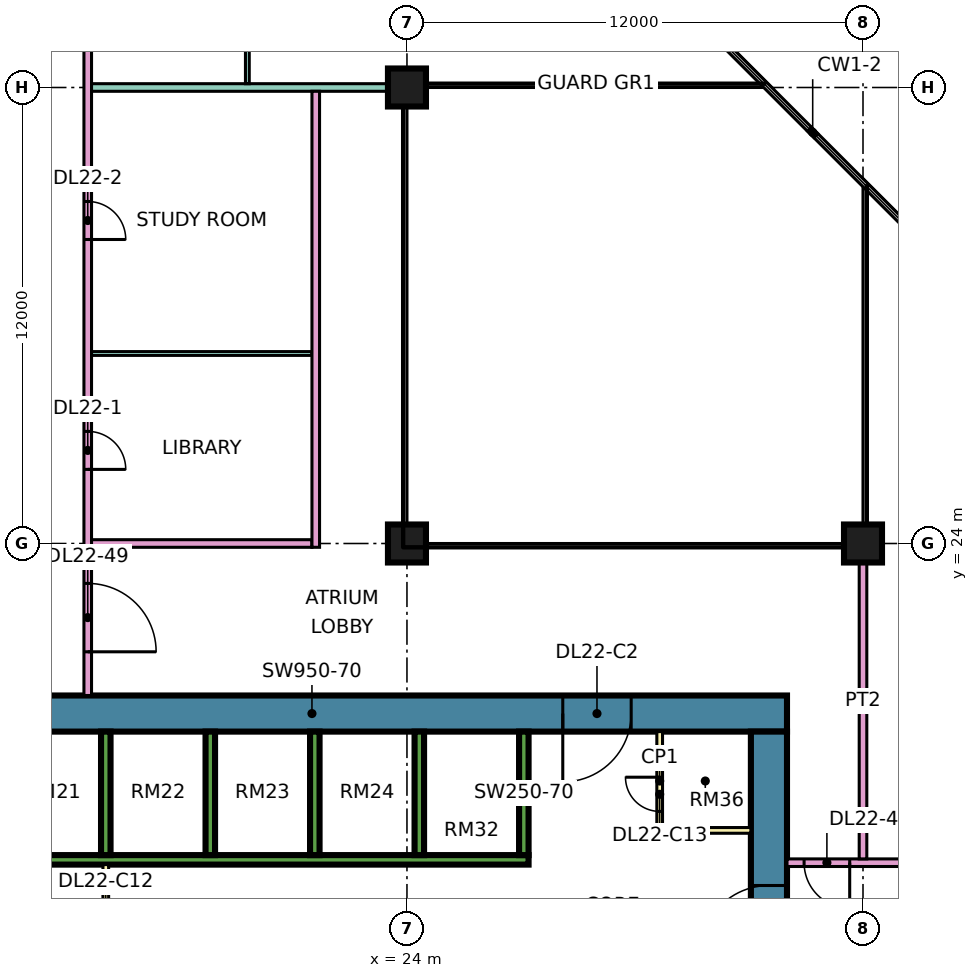
"""IFC4 building model, lengths in metres.
Left out: names, types, materials, properties, quantities, classifications, styles, units other than length and angle.
Written with IfcOpenShell. Run it as: python <this file> out.ifc"""

import sys

from ifc_helpers import new_model, si_unit, direction, frame, frame_2d, origin, origin_2d, place, context, subcontext, project, spatial, rectangle, extrude, element, fill, save


model = new_model("IFC4")
c1 = context("Model", 3, precision=1e-05, world=origin(), true_north=direction((0.0, 1.0)))
c2 = subcontext(c1, "Body", "Model", "MODEL_VIEW")
j1 = project(units=[si_unit("LENGTHUNIT", "METRE"), si_unit("PLANEANGLEUNIT", "RADIAN")], contexts=[c1])
p1 = place(None, origin())
s1 = spatial("IfcSite", under=j1, at=p1, CompositionType="ELEMENT")
p2 = place(p1, origin())
s2 = spatial("IfcBuilding", under=s1, at=p2, CompositionType="ELEMENT")
p3 = place(p2, frame((0.0, 0.0, 99.4)))
s3 = spatial("IfcBuildingStorey", under=s2, at=p3, CompositionType="ELEMENT", Elevation=99.4)
for number, where, z_axis, x_axis in (
    (1, (24.0, 24.0, 0.0), (0.0, 0.0, 1.0), (1.0, 0.0, 0.0)),
    (2, (24.0, 36.0, 0.0), (0.0, 0.0, 1.0), (1.0, 0.0, 0.0)),
    (3, (36.0, 24.0, 0.0), (0.0, 0.0, 1.0), (1.0, 0.0, 0.0)),
):
    element("IfcColumn", number, at=place(p3, frame(where, z_axis=z_axis, x_axis=x_axis)), inside=s3, PredefinedType="COLUMN", context=c2, shape_type="SweptSolid", body=[
        extrude(rectangle(XDim=1.0, YDim=1.0, at=origin_2d()), origin(), (0.0, 0.0, 1.0), 3.75),
    ])
p4 = place(p3, frame((9.0, 19.525, 0.0), z_axis=(0.0, 0.0, 1.0), x_axis=(1.0, 0.0, 0.0)))
e4 = element("IfcWall", 4, at=p4, inside=s3, PredefinedType="SHEAR", context=c2, shape_type="SweptSolid", body=[
    extrude(rectangle(XDim=25.0, YDim=0.95, at=frame_2d((12.5, 0.0))), origin(), (0.0, 0.0, 1.0), 3.75),
])
p5 = place(p4, frame((19.1, 0.0, 0.0)))
e5 = element("IfcOpeningElement", 5, at=p5, cuts=e4, PredefinedType="OPENING", context=c2, shape_type="SweptSolid", body=[
    extrude(rectangle(XDim=1.8, YDim=2.4, at=frame_2d((0.9, 1.2))), frame((0.0, 0.485, 0.0), z_axis=(0.0, -1.0, 0.0), x_axis=(1.0, 0.0, 0.0)), (0.0, 0.0, 1.0), 0.97),
])
p6 = place(p3, frame((33.525, 7.95, 0.0), z_axis=(0.0, 0.0, 1.0), x_axis=(0.0, 1.0, 0.0)))
e6 = element("IfcWall", 6, at=p6, inside=s3, PredefinedType="SHEAR", context=c2, shape_type="SweptSolid", body=[
    extrude(rectangle(XDim=11.1, YDim=0.95, at=frame_2d((5.55, 0.0))), origin(), (0.0, 0.0, 1.0), 3.75),
])
p7 = place(p6, frame((5.25, 0.0, 0.0)))
e7 = element("IfcOpeningElement", 7, at=p7, cuts=e6, PredefinedType="OPENING", context=c2, shape_type="SweptSolid", body=[
    extrude(rectangle(XDim=1.8, YDim=2.4, at=frame_2d((0.9, 1.2))), frame((0.0, 0.485, 0.0), z_axis=(0.0, -1.0, 0.0), x_axis=(1.0, 0.0, 0.0)), (0.0, 0.0, 1.0), 0.97),
])
p8 = place(p3, frame((13.45, 15.675, 0.0), z_axis=(0.0, 0.0, 1.0), x_axis=(1.0, 0.0, 0.0)))
e8 = element("IfcWall", 8, at=p8, inside=s3, PredefinedType="SHEAR", context=c2, shape_type="SweptSolid", body=[
    extrude(rectangle(XDim=13.75, YDim=0.25, at=frame_2d((6.875, 0.0))), origin(), (0.0, 0.0, 1.0), 3.75),
])
for number, where, z_axis, x_axis in (
    (9, (16.075, 15.8, 0.0), (0.0, 0.0, 1.0), (0.0, 1.0, 0.0)),
    (10, (18.825, 15.8, 0.0), (0.0, 0.0, 1.0), (0.0, 1.0, 0.0)),
    (11, (21.575, 15.8, 0.0), (0.0, 0.0, 1.0), (0.0, 1.0, 0.0)),
    (12, (24.325, 15.8, 0.0), (0.0, 0.0, 1.0), (0.0, 1.0, 0.0)),
    (13, (27.075, 15.8, 0.0), (0.0, 0.0, 1.0), (0.0, 1.0, 0.0)),
):
    element("IfcWall", number, at=place(p3, frame(where, z_axis=z_axis, x_axis=x_axis)), inside=s3, PredefinedType="SHEAR", context=c2, shape_type="SweptSolid", body=[
        extrude(rectangle(XDim=3.25, YDim=0.25, at=frame_2d((1.625, 0.0))), origin(), (0.0, 0.0, 1.0), 3.75),
    ])
p9 = place(p3, frame((16.075, 11.45, 0.0), z_axis=(0.0, 0.0, 1.0), x_axis=(0.0, 1.0, 0.0)))
e14 = element("IfcWall", 14, at=p9, inside=s3, PredefinedType="PARTITIONING", context=c2, shape_type="SweptSolid", body=[
    extrude(rectangle(XDim=4.1, YDim=0.15, at=frame_2d((2.05, 0.0))), origin(), (0.0, 0.0, 1.0), 3.35),
])
p10 = place(p9, frame((1.15, 0.0, 0.0)))
e15 = element("IfcOpeningElement", 15, at=p10, cuts=e14, PredefinedType="OPENING", context=c2, shape_type="SweptSolid", body=[
    extrude(rectangle(XDim=1.8, YDim=2.4, at=frame_2d((0.9, 1.2))), frame((0.0, 0.085, 0.0), z_axis=(0.0, -1.0, 0.0), x_axis=(1.0, 0.0, 0.0)), (0.0, 0.0, 1.0), 0.17),
])
p11 = place(p3, frame((30.65, 16.45, 0.0), z_axis=(0.0, 0.0, 1.0), x_axis=(0.0, 1.0, 0.0)))
e16 = element("IfcWall", 16, at=p11, inside=s3, PredefinedType="PARTITIONING", context=c2, shape_type="SweptSolid", body=[
    extrude(rectangle(XDim=2.6, YDim=0.15, at=frame_2d((1.3, 0.0))), origin(), (0.0, 0.0, 1.0), 3.35),
])
p12 = place(p11, frame((0.5, 0.0, 0.0)))
e17 = element("IfcOpeningElement", 17, at=p12, cuts=e16, PredefinedType="OPENING", context=c2, shape_type="SweptSolid", body=[
    extrude(rectangle(XDim=0.9, YDim=2.1, at=frame_2d((0.45, 1.05))), frame((0.0, 0.085, 0.0), z_axis=(0.0, -1.0, 0.0), x_axis=(1.0, 0.0, 0.0)), (0.0, 0.0, 1.0), 0.17),
])
p13 = place(p3, frame((30.65, 16.45, 0.0), z_axis=(0.0, 0.0, 1.0), x_axis=(1.0, 0.0, 0.0)))
e18 = element("IfcWall", 18, at=p13, inside=s3, PredefinedType="PARTITIONING", context=c2, shape_type="SweptSolid", body=[
    extrude(rectangle(XDim=2.4, YDim=0.15, at=frame_2d((1.2, 0.0))), origin(), (0.0, 0.0, 1.0), 3.35),
])
p14 = place(p3, frame((15.6, 20.0, 0.0), z_axis=(0.0, 0.0, 1.0), x_axis=(0.0, 1.0, 0.0)))
e19 = element("IfcWall", 19, at=p14, inside=s3, PredefinedType="PARTITIONING", context=c2, shape_type="SweptSolid", body=[
    extrude(rectangle(XDim=27.775, YDim=0.2, at=frame_2d((13.887, 0.0))), origin(), (0.0, 0.0, 1.0), 3.35),
])
p15 = place(p14, frame((5.95, 0.0, 0.0)))
e20 = element("IfcOpeningElement", 20, at=p15, cuts=e19, PredefinedType="OPENING", context=c2, shape_type="SweptSolid", body=[
    extrude(rectangle(XDim=1.0, YDim=2.1, at=frame_2d((0.5, 1.05))), frame((0.0, 0.11, 0.0), z_axis=(0.0, -1.0, 0.0), x_axis=(1.0, 0.0, 0.0)), (0.0, 0.0, 1.0), 0.22),
])
p16 = place(p14, frame((12.0, 0.0, 0.0)))
e21 = element("IfcOpeningElement", 21, at=p16, cuts=e19, PredefinedType="OPENING", context=c2, shape_type="SweptSolid", body=[
    extrude(rectangle(XDim=1.0, YDim=2.1, at=frame_2d((0.5, 1.05))), frame((0.0, 0.11, 0.0), z_axis=(0.0, -1.0, 0.0), x_axis=(1.0, 0.0, 0.0)), (0.0, 0.0, 1.0), 0.22),
])
p17 = place(p14, frame((17.05, 0.0, 0.0)))
e22 = element("IfcOpeningElement", 22, at=p17, cuts=e19, PredefinedType="OPENING", context=c2, shape_type="SweptSolid", body=[
    extrude(rectangle(XDim=1.0, YDim=2.1, at=frame_2d((0.5, 1.05))), frame((0.0, 0.11, 0.0), z_axis=(0.0, -1.0, 0.0), x_axis=(1.0, 0.0, 0.0)), (0.0, 0.0, 1.0), 0.22),
])
p18 = place(p14, frame((1.15, 0.0, 0.0)))
e23 = element("IfcOpeningElement", 23, at=p18, cuts=e19, PredefinedType="OPENING", context=c2, shape_type="SweptSolid", body=[
    extrude(rectangle(XDim=1.8, YDim=2.1, at=frame_2d((0.9, 1.05))), frame((0.0, 0.11, 0.0), z_axis=(0.0, -1.0, 0.0), x_axis=(1.0, 0.0, 0.0)), (0.0, 0.0, 1.0), 0.22),
])
p19 = place(p14, frame((25.9, 0.0, 0.0)))
e24 = element("IfcOpeningElement", 24, at=p19, cuts=e19, PredefinedType="OPENING", context=c2, shape_type="SweptSolid", body=[
    extrude(rectangle(XDim=1.0, YDim=2.1, at=frame_2d((0.5, 1.05))), frame((0.0, 0.11, 0.0), z_axis=(0.0, -1.0, 0.0), x_axis=(1.0, 0.0, 0.0)), (0.0, 0.0, 1.0), 0.22),
])
p20 = place(p3, frame((15.7, 24.0, 0.0), z_axis=(0.0, 0.0, 1.0), x_axis=(1.0, 0.0, 0.0)))
e25 = element("IfcWall", 25, at=p20, inside=s3, PredefinedType="PARTITIONING", context=c2, shape_type="SweptSolid", body=[
    extrude(rectangle(XDim=5.8, YDim=0.2, at=frame_2d((2.9, 0.0))), origin(), (0.0, 0.0, 1.0), 3.35),
])
p21 = place(p3, frame((15.7, 29.0, 0.0), z_axis=(0.0, 0.0, 1.0), x_axis=(1.0, 0.0, 0.0)))
e26 = element("IfcWall", 26, at=p21, inside=s3, PredefinedType="PARTITIONING", context=c2, shape_type="SweptSolid", body=[
    extrude(rectangle(XDim=5.8, YDim=0.1, at=frame_2d((2.9, 0.0))), origin(), (0.0, 0.0, 1.0), 3.35),
])
p22 = place(p3, frame((15.7, 36.0, 0.0), z_axis=(0.0, 0.0, 1.0), x_axis=(1.0, 0.0, 0.0)))
e27 = element("IfcWall", 27, at=p22, inside=s3, PredefinedType="PARTITIONING", context=c2, shape_type="SweptSolid", body=[
    extrude(rectangle(XDim=8.3, YDim=0.2, at=frame_2d((4.15, 0.0))), origin(), (0.0, 0.0, 1.0), 3.35),
])
p23 = place(p3, frame((19.8, 36.1, 0.0), z_axis=(0.0, 0.0, 1.0), x_axis=(0.0, 1.0, 0.0)))
e28 = element("IfcWall", 28, at=p23, inside=s3, PredefinedType="PARTITIONING", context=c2, shape_type="SweptSolid", body=[
    extrude(rectangle(XDim=5.95, YDim=0.1, at=frame_2d((2.975, 0.0))), origin(), (0.0, 0.0, 1.0), 3.35),
])
p24 = place(p23, frame((0.95, 0.0, 0.0)))
e29 = element("IfcOpeningElement", 29, at=p24, cuts=e28, PredefinedType="OPENING", context=c2, shape_type="SweptSolid", body=[
    extrude(rectangle(XDim=0.9, YDim=2.1, at=frame_2d((0.45, 1.05))), frame((0.0, 0.06, 0.0), z_axis=(0.0, -1.0, 0.0), x_axis=(1.0, 0.0, 0.0)), (0.0, 0.0, 1.0), 0.12),
])
p25 = place(p3, frame((21.6, 23.9, 0.0), z_axis=(0.0, 0.0, 1.0), x_axis=(0.0, 1.0, 0.0)))
e30 = element("IfcWall", 30, at=p25, inside=s3, PredefinedType="PARTITIONING", context=c2, shape_type="SweptSolid", body=[
    extrude(rectangle(XDim=12.0, YDim=0.2, at=frame_2d((6.0, 0.0))), origin(), (0.0, 0.0, 1.0), 3.35),
])
p26 = place(p3, frame((34.0, 15.6, 0.0), z_axis=(0.0, 0.0, 1.0), x_axis=(1.0, 0.0, 0.0)))
e31 = element("IfcWall", 31, at=p26, inside=s3, PredefinedType="PARTITIONING", context=c2, shape_type="SweptSolid", body=[
    extrude(rectangle(XDim=10.35, YDim=0.2, at=frame_2d((5.175, 0.0))), origin(), (0.0, 0.0, 1.0), 3.35),
])
p27 = place(p26, frame((5.6, 0.0, 0.0)))
e32 = element("IfcOpeningElement", 32, at=p27, cuts=e31, PredefinedType="OPENING", context=c2, shape_type="SweptSolid", body=[
    extrude(rectangle(XDim=1.0, YDim=2.1, at=frame_2d((0.5, 1.05))), frame((0.0, 0.11, 0.0), z_axis=(0.0, -1.0, 0.0), x_axis=(1.0, 0.0, 0.0)), (0.0, 0.0, 1.0), 0.22),
])
p28 = place(p26, frame((0.45, 0.0, 0.0)))
e33 = element("IfcOpeningElement", 33, at=p28, cuts=e31, PredefinedType="OPENING", context=c2, shape_type="SweptSolid", body=[
    extrude(rectangle(XDim=1.2, YDim=2.1, at=frame_2d((0.6, 1.05))), frame((0.0, 0.11, 0.0), z_axis=(0.0, -1.0, 0.0), x_axis=(1.0, 0.0, 0.0)), (0.0, 0.0, 1.0), 0.22),
])
p29 = place(p3, frame((36.0, 15.7, 0.0), z_axis=(0.0, 0.0, 1.0), x_axis=(0.0, 1.0, 0.0)))
e34 = element("IfcWall", 34, at=p29, inside=s3, PredefinedType="PARTITIONING", context=c2, shape_type="SweptSolid", body=[
    extrude(rectangle(XDim=8.3, YDim=0.2, at=frame_2d((4.15, 0.0))), origin(), (0.0, 0.0, 1.0), 3.35),
])
p30 = place(p7, origin())
e35 = element("IfcDoor", 35, at=p30, inside=s3, OperationType="DOUBLE_DOOR_SINGLE_SWING", PredefinedType="DOOR", context=c2, shape_type="SweptSolid", body=[
    extrude(rectangle(XDim=1.8, YDim=2.4, at=frame_2d((0.9, 1.2))), frame((0.0, 0.025, 0.0), z_axis=(0.0, -1.0, 0.0), x_axis=(1.0, 0.0, 0.0)), (0.0, 0.0, 1.0), 0.05),
])
fill(e7, e35)
p31 = place(p5, frame((1.8, 0.0, 0.0), z_axis=(0.0, 0.0, 1.0), x_axis=(-1.0, 0.0, 0.0)))
e36 = element("IfcDoor", 36, at=p31, inside=s3, OperationType="DOUBLE_DOOR_SINGLE_SWING", PredefinedType="DOOR", context=c2, shape_type="SweptSolid", body=[
    extrude(rectangle(XDim=1.8, YDim=2.4, at=frame_2d((0.9, 1.2))), frame((0.0, 0.025, 0.0), z_axis=(0.0, -1.0, 0.0), x_axis=(1.0, 0.0, 0.0)), (0.0, 0.0, 1.0), 0.05),
])
fill(e5, e36)
p32 = place(p12, frame((0.9, 0.0, 0.0), z_axis=(0.0, 0.0, 1.0), x_axis=(-1.0, 0.0, 0.0)))
e37 = element("IfcDoor", 37, at=p32, inside=s3, OperationType="SINGLE_SWING_RIGHT", PredefinedType="DOOR", context=c2, shape_type="SweptSolid", body=[
    extrude(rectangle(XDim=0.9, YDim=2.1, at=frame_2d((0.45, 1.05))), frame((0.0, 0.025, 0.0), z_axis=(0.0, -1.0, 0.0), x_axis=(1.0, 0.0, 0.0)), (0.0, 0.0, 1.0), 0.05),
])
fill(e17, e37)
p33 = place(p15, frame((1.0, 0.0, 0.0), z_axis=(0.0, 0.0, 1.0), x_axis=(-1.0, 0.0, 0.0)))
e38 = element("IfcDoor", 38, at=p33, inside=s3, OperationType="SINGLE_SWING_LEFT", PredefinedType="DOOR", context=c2, shape_type="SweptSolid", body=[
    extrude(rectangle(XDim=1.0, YDim=2.1, at=frame_2d((0.5, 1.05))), frame((0.0, 0.025, 0.0), z_axis=(0.0, -1.0, 0.0), x_axis=(1.0, 0.0, 0.0)), (0.0, 0.0, 1.0), 0.05),
])
fill(e20, e38)
p34 = place(p16, frame((1.0, 0.0, 0.0), z_axis=(0.0, 0.0, 1.0), x_axis=(-1.0, 0.0, 0.0)))
e39 = element("IfcDoor", 39, at=p34, inside=s3, OperationType="SINGLE_SWING_LEFT", PredefinedType="DOOR", context=c2, shape_type="SweptSolid", body=[
    extrude(rectangle(XDim=1.0, YDim=2.1, at=frame_2d((0.5, 1.05))), frame((0.0, 0.025, 0.0), z_axis=(0.0, -1.0, 0.0), x_axis=(1.0, 0.0, 0.0)), (0.0, 0.0, 1.0), 0.05),
])
fill(e21, e39)
p35 = place(p28, origin())
e40 = element("IfcDoor", 40, at=p35, inside=s3, OperationType="SINGLE_SWING_RIGHT", PredefinedType="DOOR", context=c2, shape_type="SweptSolid", body=[
    extrude(rectangle(XDim=1.2, YDim=2.1, at=frame_2d((0.6, 1.05))), frame((0.0, 0.025, 0.0), z_axis=(0.0, -1.0, 0.0), x_axis=(1.0, 0.0, 0.0)), (0.0, 0.0, 1.0), 0.05),
])
fill(e33, e40)
p36 = place(p18, frame((1.8, 0.0, 0.0), z_axis=(0.0, 0.0, 1.0), x_axis=(-1.0, 0.0, 0.0)))
e41 = element("IfcDoor", 41, at=p36, inside=s3, OperationType="DOUBLE_DOOR_SINGLE_SWING", PredefinedType="DOOR", context=c2, shape_type="SweptSolid", body=[
    extrude(rectangle(XDim=1.8, YDim=2.1, at=frame_2d((0.9, 1.05))), frame((0.0, 0.025, 0.0), z_axis=(0.0, -1.0, 0.0), x_axis=(1.0, 0.0, 0.0)), (0.0, 0.0, 1.0), 0.05),
])
fill(e23, e41)
save(model, sys.argv[1])
